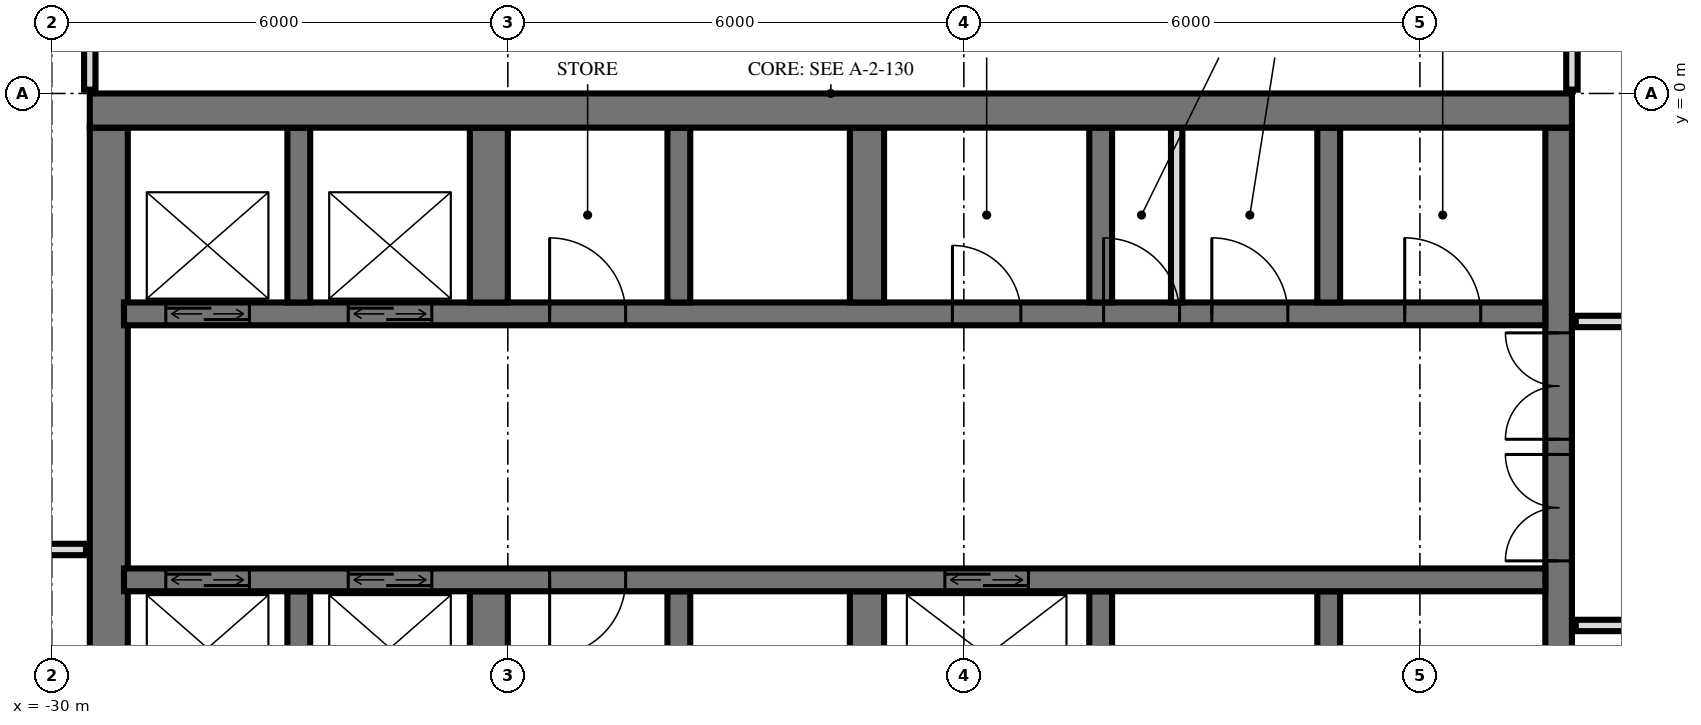
"""IFC4 building model, lengths in metres.
Left out: names, types, materials, properties, quantities, classifications, styles, units other than length and angle.
Written with IfcOpenShell. Run it as: python <this file> out.ifc"""

import sys

from ifc_helpers import new_model, si_unit, direction, frame, frame_2d, origin, place, context, subcontext, project, spatial, rectangle, extrude, element, fill, save


model = new_model("IFC4")
c1 = context("Model", 3, precision=1e-05, world=origin(), true_north=direction((0.0, 1.0)))
c2 = subcontext(c1, "Body", "Model", "MODEL_VIEW")
j1 = project(units=[si_unit("LENGTHUNIT", "METRE"), si_unit("PLANEANGLEUNIT", "RADIAN")], contexts=[c1])
p1 = place(None, origin())
s1 = spatial("IfcSite", under=j1, at=p1, CompositionType="ELEMENT")
p2 = place(p1, origin())
s2 = spatial("IfcBuilding", under=s1, at=p2, CompositionType="ELEMENT")
p3 = place(p2, frame((0.0, 0.0, 49.2)))
s3 = spatial("IfcBuildingStorey", under=s2, at=p3, CompositionType="ELEMENT", Elevation=49.2)
p4 = place(p3, frame((-29.5, -0.225, 0.0), z_axis=(0.0, 0.0, 1.0), x_axis=(1.0, 0.0, 0.0)))
e1 = element("IfcWall", 1, at=p4, inside=s3, PredefinedType="SHEAR", context=c2, shape_type="SweptSolid", body=[
    extrude(rectangle(XDim=19.5, YDim=0.45, at=frame_2d((9.75, 0.0))), origin(), (0.0, 0.0, 1.0), 3.6),
])
p5 = place(p3, frame((-10.175, -14.55, 0.0), z_axis=(0.0, 0.0, 1.0), x_axis=(0.0, 1.0, 0.0)))
e2 = element("IfcWall", 2, at=p5, inside=s3, PredefinedType="SHEAR", context=c2, shape_type="SweptSolid", body=[
    extrude(rectangle(XDim=14.1, YDim=0.35, at=frame_2d((7.05, 0.0))), origin(), (0.0, 0.0, 1.0), 3.6),
])
p6 = place(p5, frame((8.4, 0.0, 0.0)))
e3 = element("IfcOpeningElement", 3, at=p6, cuts=e2, PredefinedType="OPENING", context=c2, shape_type="SweptSolid", body=[
    extrude(rectangle(XDim=1.4, YDim=2.4, at=frame_2d((0.7, 1.2))), frame((0.0, 0.185, 0.0), z_axis=(0.0, -1.0, 0.0), x_axis=(1.0, 0.0, 0.0)), (0.0, 0.0, 1.0), 0.37),
])
p7 = place(p5, frame((10.0, 0.0, 0.0)))
e4 = element("IfcOpeningElement", 4, at=p7, cuts=e2, PredefinedType="OPENING", context=c2, shape_type="SweptSolid", body=[
    extrude(rectangle(XDim=1.4, YDim=2.4, at=frame_2d((0.7, 1.2))), frame((0.0, 0.185, 0.0), z_axis=(0.0, -1.0, 0.0), x_axis=(1.0, 0.0, 0.0)), (0.0, 0.0, 1.0), 0.37),
])
p8 = place(p5, frame((4.0, 0.0, 0.0)))
e5 = element("IfcOpeningElement", 5, at=p8, cuts=e2, PredefinedType="OPENING", context=c2, shape_type="SweptSolid", body=[
    extrude(rectangle(XDim=1.2, YDim=2.1, at=frame_2d((0.6, 1.05))), frame((0.0, 0.185, 0.0), z_axis=(0.0, -1.0, 0.0), x_axis=(1.0, 0.0, 0.0)), (0.0, 0.0, 1.0), 0.37),
])
p9 = place(p3, frame((-29.25, -14.55, 0.0), z_axis=(0.0, 0.0, 1.0), x_axis=(0.0, 1.0, 0.0)))
e6 = element("IfcWall", 6, at=p9, inside=s3, PredefinedType="SHEAR", context=c2, shape_type="SweptSolid", body=[
    extrude(rectangle(XDim=14.1, YDim=0.5, at=frame_2d((7.05, 0.0))), origin(), (0.0, 0.0, 1.0), 3.6),
])
p10 = place(p3, frame((-29.05, -2.9, 0.0), z_axis=(0.0, 0.0, 1.0), x_axis=(1.0, 0.0, 0.0)))
e7 = element("IfcWall", 7, at=p10, inside=s3, PredefinedType="SHEAR", context=c2, shape_type="SweptSolid", body=[
    extrude(rectangle(XDim=18.7, YDim=0.3, at=frame_2d((9.35, 0.0))), origin(), (0.0, 0.0, 1.0), 3.6),
])
p11 = place(p10, frame((2.95, 0.0, 0.0)))
e8 = element("IfcOpeningElement", 8, at=p11, cuts=e7, PredefinedType="OPENING", context=c2, shape_type="SweptSolid", body=[
    extrude(rectangle(XDim=1.1, YDim=2.1, at=frame_2d((0.55, 1.05))), frame((0.0, 0.16, 0.0), z_axis=(0.0, -1.0, 0.0), x_axis=(1.0, 0.0, 0.0)), (0.0, 0.0, 1.0), 0.32),
])
p12 = place(p10, frame((0.55, 0.0, 0.0)))
e9 = element("IfcOpeningElement", 9, at=p12, cuts=e7, PredefinedType="OPENING", context=c2, shape_type="SweptSolid", body=[
    extrude(rectangle(XDim=1.1, YDim=2.1, at=frame_2d((0.55, 1.05))), frame((0.0, 0.16, 0.0), z_axis=(0.0, -1.0, 0.0), x_axis=(1.0, 0.0, 0.0)), (0.0, 0.0, 1.0), 0.32),
])
p13 = place(p10, frame((10.9, 0.0, 0.0)))
e10 = element("IfcOpeningElement", 10, at=p13, cuts=e7, PredefinedType="OPENING", context=c2, shape_type="SweptSolid", body=[
    extrude(rectangle(XDim=0.9, YDim=2.1, at=frame_2d((0.45, 1.05))), frame((0.0, 0.16, 0.0), z_axis=(0.0, -1.0, 0.0), x_axis=(1.0, 0.0, 0.0)), (0.0, 0.0, 1.0), 0.32),
])
p14 = place(p10, frame((16.85, 0.0, 0.0)))
e11 = element("IfcOpeningElement", 11, at=p14, cuts=e7, PredefinedType="OPENING", context=c2, shape_type="SweptSolid", body=[
    extrude(rectangle(XDim=1.0, YDim=2.1, at=frame_2d((0.5, 1.05))), frame((0.0, 0.16, 0.0), z_axis=(0.0, -1.0, 0.0), x_axis=(1.0, 0.0, 0.0)), (0.0, 0.0, 1.0), 0.32),
])
p15 = place(p10, frame((14.312, 0.0, 0.0)))
e12 = element("IfcOpeningElement", 12, at=p15, cuts=e7, PredefinedType="OPENING", context=c2, shape_type="SweptSolid", body=[
    extrude(rectangle(XDim=1.0, YDim=2.1, at=frame_2d((0.5, 1.05))), frame((0.0, 0.16, 0.0), z_axis=(0.0, -1.0, 0.0), x_axis=(1.0, 0.0, 0.0)), (0.0, 0.0, 1.0), 0.32),
])
p16 = place(p10, frame((12.887, 0.0, 0.0)))
e13 = element("IfcOpeningElement", 13, at=p16, cuts=e7, PredefinedType="OPENING", context=c2, shape_type="SweptSolid", body=[
    extrude(rectangle(XDim=1.0, YDim=2.1, at=frame_2d((0.5, 1.05))), frame((0.0, 0.16, 0.0), z_axis=(0.0, -1.0, 0.0), x_axis=(1.0, 0.0, 0.0)), (0.0, 0.0, 1.0), 0.32),
])
p17 = place(p10, frame((5.6, 0.0, 0.0)))
e14 = element("IfcOpeningElement", 14, at=p17, cuts=e7, PredefinedType="OPENING", context=c2, shape_type="SweptSolid", body=[
    extrude(rectangle(XDim=1.0, YDim=2.1, at=frame_2d((0.5, 1.05))), frame((0.0, 0.16, 0.0), z_axis=(0.0, -1.0, 0.0), x_axis=(1.0, 0.0, 0.0)), (0.0, 0.0, 1.0), 0.32),
])
p18 = place(p3, frame((-29.05, -6.4, 0.0), z_axis=(0.0, 0.0, 1.0), x_axis=(1.0, 0.0, 0.0)))
e15 = element("IfcWall", 15, at=p18, inside=s3, PredefinedType="SHEAR", context=c2, shape_type="SweptSolid", body=[
    extrude(rectangle(XDim=18.7, YDim=0.3, at=frame_2d((9.35, 0.0))), origin(), (0.0, 0.0, 1.0), 3.6),
])
p19 = place(p18, frame((2.95, 0.0, 0.0)))
e16 = element("IfcOpeningElement", 16, at=p19, cuts=e15, PredefinedType="OPENING", context=c2, shape_type="SweptSolid", body=[
    extrude(rectangle(XDim=1.1, YDim=2.1, at=frame_2d((0.55, 1.05))), frame((0.0, 0.16, 0.0), z_axis=(0.0, -1.0, 0.0), x_axis=(1.0, 0.0, 0.0)), (0.0, 0.0, 1.0), 0.32),
])
p20 = place(p18, frame((0.55, 0.0, 0.0)))
e17 = element("IfcOpeningElement", 17, at=p20, cuts=e15, PredefinedType="OPENING", context=c2, shape_type="SweptSolid", body=[
    extrude(rectangle(XDim=1.1, YDim=2.1, at=frame_2d((0.55, 1.05))), frame((0.0, 0.16, 0.0), z_axis=(0.0, -1.0, 0.0), x_axis=(1.0, 0.0, 0.0)), (0.0, 0.0, 1.0), 0.32),
])
p21 = place(p18, frame((10.8, 0.0, 0.0)))
e18 = element("IfcOpeningElement", 18, at=p21, cuts=e15, PredefinedType="OPENING", context=c2, shape_type="SweptSolid", body=[
    extrude(rectangle(XDim=1.1, YDim=2.1, at=frame_2d((0.55, 1.05))), frame((0.0, 0.16, 0.0), z_axis=(0.0, -1.0, 0.0), x_axis=(1.0, 0.0, 0.0)), (0.0, 0.0, 1.0), 0.32),
])
p22 = place(p18, frame((5.6, 0.0, 0.0)))
e19 = element("IfcOpeningElement", 19, at=p22, cuts=e15, PredefinedType="OPENING", context=c2, shape_type="SweptSolid", body=[
    extrude(rectangle(XDim=1.0, YDim=2.1, at=frame_2d((0.5, 1.05))), frame((0.0, 0.16, 0.0), z_axis=(0.0, -1.0, 0.0), x_axis=(1.0, 0.0, 0.0)), (0.0, 0.0, 1.0), 0.32),
])
for number, where, z_axis, x_axis in (
    (20, (-13.2, -2.75, 0.0), (0.0, 0.0, 1.0), (0.0, 1.0, 0.0)),
    (21, (-13.2, -8.85, 0.0), (0.0, 0.0, 1.0), (0.0, 1.0, 0.0)),
    (22, (-16.2, -2.75, 0.0), (0.0, 0.0, 1.0), (0.0, 1.0, 0.0)),
    (23, (-16.2, -8.85, 0.0), (0.0, 0.0, 1.0), (0.0, 1.0, 0.0)),
):
    element("IfcWall", number, at=place(p3, frame(where, z_axis=z_axis, x_axis=x_axis)), inside=s3, PredefinedType="SHEAR", context=c2, shape_type="SweptSolid", body=[
        extrude(rectangle(XDim=2.3, YDim=0.3, at=frame_2d((1.15, 0.0))), origin(), (0.0, 0.0, 1.0), 3.6),
    ])
for number, where, z_axis, x_axis in (
    (24, (-19.275, -2.75, 0.0), (0.0, 0.0, 1.0), (0.0, 1.0, 0.0)),
    (25, (-19.275, -8.85, 0.0), (0.0, 0.0, 1.0), (0.0, 1.0, 0.0)),
):
    element("IfcWall", number, at=place(p3, frame(where, z_axis=z_axis, x_axis=x_axis)), inside=s3, PredefinedType="SHEAR", context=c2, shape_type="SweptSolid", body=[
        extrude(rectangle(XDim=2.3, YDim=0.45, at=frame_2d((1.15, 0.0))), origin(), (0.0, 0.0, 1.0), 3.6),
    ])
for number, where, z_axis, x_axis in (
    (26, (-21.75, -2.75, 0.0), (0.0, 0.0, 1.0), (0.0, 1.0, 0.0)),
    (27, (-21.75, -8.85, 0.0), (0.0, 0.0, 1.0), (0.0, 1.0, 0.0)),
):
    element("IfcWall", number, at=place(p3, frame(where, z_axis=z_axis, x_axis=x_axis)), inside=s3, PredefinedType="SHEAR", context=c2, shape_type="SweptSolid", body=[
        extrude(rectangle(XDim=2.3, YDim=0.3, at=frame_2d((1.15, 0.0))), origin(), (0.0, 0.0, 1.0), 3.6),
    ])
for number, where, z_axis, x_axis in (
    (28, (-24.25, -2.75, 0.0), (0.0, 0.0, 1.0), (0.0, 1.0, 0.0)),
    (29, (-24.25, -8.85, 0.0), (0.0, 0.0, 1.0), (0.0, 1.0, 0.0)),
):
    element("IfcWall", number, at=place(p3, frame(where, z_axis=z_axis, x_axis=x_axis)), inside=s3, PredefinedType="SHEAR", context=c2, shape_type="SweptSolid", body=[
        extrude(rectangle(XDim=2.3, YDim=0.5, at=frame_2d((1.15, 0.0))), origin(), (0.0, 0.0, 1.0), 3.6),
    ])
for number, where, z_axis, x_axis in (
    (30, (-26.75, -2.75, 0.0), (0.0, 0.0, 1.0), (0.0, 1.0, 0.0)),
    (31, (-26.75, -8.85, 0.0), (0.0, 0.0, 1.0), (0.0, 1.0, 0.0)),
):
    element("IfcWall", number, at=place(p3, frame(where, z_axis=z_axis, x_axis=x_axis)), inside=s3, PredefinedType="SHEAR", context=c2, shape_type="SweptSolid", body=[
        extrude(rectangle(XDim=2.3, YDim=0.3, at=frame_2d((1.15, 0.0))), origin(), (0.0, 0.0, 1.0), 3.6),
    ])
p23 = place(p3, frame((-15.2, -2.75, 0.0), z_axis=(0.0, 0.0, 1.0), x_axis=(0.0, 1.0, 0.0)))
e32 = element("IfcWall", 32, at=p23, inside=s3, PredefinedType="PARTITIONING", context=c2, shape_type="SweptSolid", body=[
    extrude(rectangle(XDim=2.3, YDim=0.15, at=frame_2d((1.15, 0.0))), origin(), (0.0, 0.0, 1.0), 3.3),
])
p24 = place(p3, frame((-10.0, 0.05, 0.0), z_axis=(0.0, 0.0, 1.0), x_axis=(0.0, 1.0, 0.0)))
e33 = element("IfcWall", 33, at=p24, inside=s3, PredefinedType="PARTITIONING", context=c2, shape_type="SweptSolid", body=[
    extrude(rectangle(XDim=0.97, YDim=0.15, at=frame_2d((0.485, 0.0))), origin(), (0.0, 0.0, 1.0), 3.32),
])
p25 = place(p3, frame((-29.5, 0.05, 0.0), z_axis=(0.0, 0.0, 1.0), x_axis=(0.0, 1.0, 0.0)))
e34 = element("IfcWall", 34, at=p25, inside=s3, PredefinedType="PARTITIONING", context=c2, shape_type="SweptSolid", body=[
    extrude(rectangle(XDim=0.827, YDim=0.15, at=frame_2d((0.414, 0.0))), origin(), (0.0, 0.0, 1.0), 3.32),
])
p26 = place(p3, frame((-9.95, -7.0, 0.0), z_axis=(0.0, 0.0, 1.0), x_axis=(1.0, 0.0, 0.0)))
e35 = element("IfcWall", 35, at=p26, inside=s3, PredefinedType="PARTITIONING", context=c2, shape_type="SweptSolid", body=[
    extrude(rectangle(XDim=19.9, YDim=0.15, at=frame_2d((9.95, 0.0))), origin(), (0.0, 0.0, 1.0), 3.32),
])
p27 = place(p26, frame((9.45, 0.0, 0.0)))
e36 = element("IfcOpeningElement", 36, at=p27, cuts=e35, PredefinedType="OPENING", context=c2, shape_type="SweptSolid", body=[
    extrude(rectangle(XDim=1.0, YDim=2.1, at=frame_2d((0.5, 1.05))), frame((0.0, 0.085, 0.0), z_axis=(0.0, -1.0, 0.0), x_axis=(1.0, 0.0, 0.0)), (0.0, 0.0, 1.0), 0.17),
])
p28 = place(p26, frame((3.45, 0.0, 0.0)))
e37 = element("IfcOpeningElement", 37, at=p28, cuts=e35, PredefinedType="OPENING", context=c2, shape_type="SweptSolid", body=[
    extrude(rectangle(XDim=1.0, YDim=2.1, at=frame_2d((0.5, 1.05))), frame((0.0, 0.085, 0.0), z_axis=(0.0, -1.0, 0.0), x_axis=(1.0, 0.0, 0.0)), (0.0, 0.0, 1.0), 0.17),
])
p29 = place(p3, frame((-33.12, -6.0, 0.0), z_axis=(0.0, 0.0, 1.0), x_axis=(1.0, 0.0, 0.0)))
e38 = element("IfcWall", 38, at=p29, inside=s3, PredefinedType="PLUMBINGWALL", context=c2, shape_type="SweptSolid", body=[
    extrude(rectangle(XDim=3.57, YDim=0.15, at=frame_2d((1.785, 0.0))), origin(), (0.0, 0.0, 1.0), 3.32),
])
p30 = place(p29, frame((1.27, 0.0, 0.0)))
e39 = element("IfcOpeningElement", 39, at=p30, cuts=e38, PredefinedType="OPENING", context=c2, shape_type="SweptSolid", body=[
    extrude(rectangle(XDim=0.9, YDim=2.1, at=frame_2d((0.45, 1.05))), frame((0.0, 0.085, 0.0), z_axis=(0.0, -1.0, 0.0), x_axis=(1.0, 0.0, 0.0)), (0.0, 0.0, 1.0), 0.17),
])
p31 = place(p3, frame((-9.95, -3.0, 0.0), z_axis=(0.0, 0.0, 1.0), x_axis=(1.0, 0.0, 0.0)))
e40 = element("IfcWall", 40, at=p31, inside=s3, PredefinedType="PARTITIONING", context=c2, shape_type="SweptSolid", body=[
    extrude(rectangle(XDim=19.9, YDim=0.15, at=frame_2d((9.95, 0.0))), origin(), (0.0, 0.0, 1.0), 3.32),
])
p32 = place(p31, frame((4.2, 0.0, 0.0)))
e41 = element("IfcOpeningElement", 41, at=p32, cuts=e40, PredefinedType="OPENING", context=c2, shape_type="SweptSolid", body=[
    extrude(rectangle(XDim=1.0, YDim=2.1, at=frame_2d((0.5, 1.05))), frame((0.0, 0.085, 0.0), z_axis=(0.0, -1.0, 0.0), x_axis=(1.0, 0.0, 0.0)), (0.0, 0.0, 1.0), 0.17),
])
p33 = place(p31, frame((11.45, 0.0, 0.0)))
e42 = element("IfcOpeningElement", 42, at=p33, cuts=e40, PredefinedType="OPENING", context=c2, shape_type="SweptSolid", body=[
    extrude(rectangle(XDim=1.0, YDim=2.1, at=frame_2d((0.5, 1.05))), frame((0.0, 0.085, 0.0), z_axis=(0.0, -1.0, 0.0), x_axis=(1.0, 0.0, 0.0)), (0.0, 0.0, 1.0), 0.17),
])
p34 = place(p31, frame((15.45, 0.0, 0.0)))
e43 = element("IfcOpeningElement", 43, at=p34, cuts=e40, PredefinedType="OPENING", context=c2, shape_type="SweptSolid", body=[
    extrude(rectangle(XDim=1.0, YDim=2.1, at=frame_2d((0.5, 1.05))), frame((0.0, 0.085, 0.0), z_axis=(0.0, -1.0, 0.0), x_axis=(1.0, 0.0, 0.0)), (0.0, 0.0, 1.0), 0.17),
])
p35 = place(p31, frame((18.2, 0.0, 0.0)))
e44 = element("IfcOpeningElement", 44, at=p35, cuts=e40, PredefinedType="OPENING", context=c2, shape_type="SweptSolid", body=[
    extrude(rectangle(XDim=1.0, YDim=2.1, at=frame_2d((0.5, 1.05))), frame((0.0, 0.085, 0.0), z_axis=(0.0, -1.0, 0.0), x_axis=(1.0, 0.0, 0.0)), (0.0, 0.0, 1.0), 0.17),
])
p36 = place(p11, origin())
e45 = element("IfcDoor", 45, at=p36, inside=s3, OperationType="DOUBLE_DOOR_SLIDING", PredefinedType="USERDEFINED", context=c2, shape_type="SweptSolid", body=[
    extrude(rectangle(XDim=1.1, YDim=2.1, at=frame_2d((0.55, 1.05))), frame((0.0, 0.025, 0.0), z_axis=(0.0, -1.0, 0.0), x_axis=(1.0, 0.0, 0.0)), (0.0, 0.0, 1.0), 0.05),
])
fill(e8, e45)
p37 = place(p12, origin())
e46 = element("IfcDoor", 46, at=p37, inside=s3, OperationType="DOUBLE_DOOR_SLIDING", PredefinedType="USERDEFINED", context=c2, shape_type="SweptSolid", body=[
    extrude(rectangle(XDim=1.1, YDim=2.1, at=frame_2d((0.55, 1.05))), frame((0.0, 0.025, 0.0), z_axis=(0.0, -1.0, 0.0), x_axis=(1.0, 0.0, 0.0)), (0.0, 0.0, 1.0), 0.05),
])
fill(e9, e46)
p38 = place(p19, origin())
e47 = element("IfcDoor", 47, at=p38, inside=s3, OperationType="DOUBLE_DOOR_SLIDING", PredefinedType="USERDEFINED", context=c2, shape_type="SweptSolid", body=[
    extrude(rectangle(XDim=1.1, YDim=2.1, at=frame_2d((0.55, 1.05))), frame((0.0, 0.025, 0.0), z_axis=(0.0, -1.0, 0.0), x_axis=(1.0, 0.0, 0.0)), (0.0, 0.0, 1.0), 0.05),
])
fill(e16, e47)
p39 = place(p20, origin())
e48 = element("IfcDoor", 48, at=p39, inside=s3, OperationType="DOUBLE_DOOR_SLIDING", PredefinedType="USERDEFINED", context=c2, shape_type="SweptSolid", body=[
    extrude(rectangle(XDim=1.1, YDim=2.1, at=frame_2d((0.55, 1.05))), frame((0.0, 0.025, 0.0), z_axis=(0.0, -1.0, 0.0), x_axis=(1.0, 0.0, 0.0)), (0.0, 0.0, 1.0), 0.05),
])
fill(e17, e48)
p40 = place(p21, origin())
e49 = element("IfcDoor", 49, at=p40, inside=s3, OperationType="DOUBLE_DOOR_SLIDING", PredefinedType="USERDEFINED", context=c2, shape_type="SweptSolid", body=[
    extrude(rectangle(XDim=1.1, YDim=2.1, at=frame_2d((0.55, 1.05))), frame((0.0, 0.025, 0.0), z_axis=(0.0, -1.0, 0.0), x_axis=(1.0, 0.0, 0.0)), (0.0, 0.0, 1.0), 0.05),
])
fill(e18, e49)
p41 = place(p6, origin())
e50 = element("IfcDoor", 50, at=p41, inside=s3, OperationType="DOUBLE_DOOR_SINGLE_SWING", PredefinedType="DOOR", context=c2, shape_type="SweptSolid", body=[
    extrude(rectangle(XDim=1.4, YDim=2.4, at=frame_2d((0.7, 1.2))), frame((0.0, 0.025, 0.0), z_axis=(0.0, -1.0, 0.0), x_axis=(1.0, 0.0, 0.0)), (0.0, 0.0, 1.0), 0.05),
])
fill(e3, e50)
p42 = place(p7, origin())
e51 = element("IfcDoor", 51, at=p42, inside=s3, OperationType="DOUBLE_DOOR_SINGLE_SWING", PredefinedType="DOOR", context=c2, shape_type="SweptSolid", body=[
    extrude(rectangle(XDim=1.4, YDim=2.4, at=frame_2d((0.7, 1.2))), frame((0.0, 0.025, 0.0), z_axis=(0.0, -1.0, 0.0), x_axis=(1.0, 0.0, 0.0)), (0.0, 0.0, 1.0), 0.05),
])
fill(e4, e51)
p43 = place(p13, origin())
e52 = element("IfcDoor", 52, at=p43, inside=s3, OperationType="SINGLE_SWING_RIGHT", PredefinedType="DOOR", context=c2, shape_type="SweptSolid", body=[
    extrude(rectangle(XDim=0.9, YDim=2.1, at=frame_2d((0.45, 1.05))), frame((0.0, 0.025, 0.0), z_axis=(0.0, -1.0, 0.0), x_axis=(1.0, 0.0, 0.0)), (0.0, 0.0, 1.0), 0.05),
])
fill(e10, e52)
p44 = place(p14, origin())
e53 = element("IfcDoor", 53, at=p44, inside=s3, OperationType="SINGLE_SWING_RIGHT", PredefinedType="DOOR", context=c2, shape_type="SweptSolid", body=[
    extrude(rectangle(XDim=1.0, YDim=2.1, at=frame_2d((0.5, 1.05))), frame((0.0, 0.025, 0.0), z_axis=(0.0, -1.0, 0.0), x_axis=(1.0, 0.0, 0.0)), (0.0, 0.0, 1.0), 0.05),
])
fill(e11, e53)
p45 = place(p15, origin())
e54 = element("IfcDoor", 54, at=p45, inside=s3, OperationType="SINGLE_SWING_RIGHT", PredefinedType="DOOR", context=c2, shape_type="SweptSolid", body=[
    extrude(rectangle(XDim=1.0, YDim=2.1, at=frame_2d((0.5, 1.05))), frame((0.0, 0.025, 0.0), z_axis=(0.0, -1.0, 0.0), x_axis=(1.0, 0.0, 0.0)), (0.0, 0.0, 1.0), 0.05),
])
fill(e12, e54)
p46 = place(p16, origin())
e55 = element("IfcDoor", 55, at=p46, inside=s3, OperationType="SINGLE_SWING_RIGHT", PredefinedType="DOOR", context=c2, shape_type="SweptSolid", body=[
    extrude(rectangle(XDim=1.0, YDim=2.1, at=frame_2d((0.5, 1.05))), frame((0.0, 0.025, 0.0), z_axis=(0.0, -1.0, 0.0), x_axis=(1.0, 0.0, 0.0)), (0.0, 0.0, 1.0), 0.05),
])
fill(e13, e55)
p47 = place(p17, origin())
e56 = element("IfcDoor", 56, at=p47, inside=s3, OperationType="SINGLE_SWING_RIGHT", PredefinedType="DOOR", context=c2, shape_type="SweptSolid", body=[
    extrude(rectangle(XDim=1.0, YDim=2.1, at=frame_2d((0.5, 1.05))), frame((0.0, 0.025, 0.0), z_axis=(0.0, -1.0, 0.0), x_axis=(1.0, 0.0, 0.0)), (0.0, 0.0, 1.0), 0.05),
])
fill(e14, e56)
p48 = place(p22, frame((0.5, 0.0, 0.0), z_axis=(0.0, 0.0, 1.0), x_axis=(-1.0, 0.0, 0.0)))
e57 = element("IfcDoor", 57, at=p48, inside=s3, OperationType="SINGLE_SWING_LEFT", PredefinedType="DOOR", context=c2, shape_type="SweptSolid", body=[
    extrude(rectangle(XDim=1.0, YDim=2.1, at=frame_2d((0.0, 1.05))), frame((0.0, -0.025, 0.0), z_axis=(0.0, 1.0, 0.0), x_axis=(-1.0, 0.0, 0.0)), (0.0, 0.0, 1.0), 0.05),
])
fill(e19, e57)
save(model, sys.argv[1])
